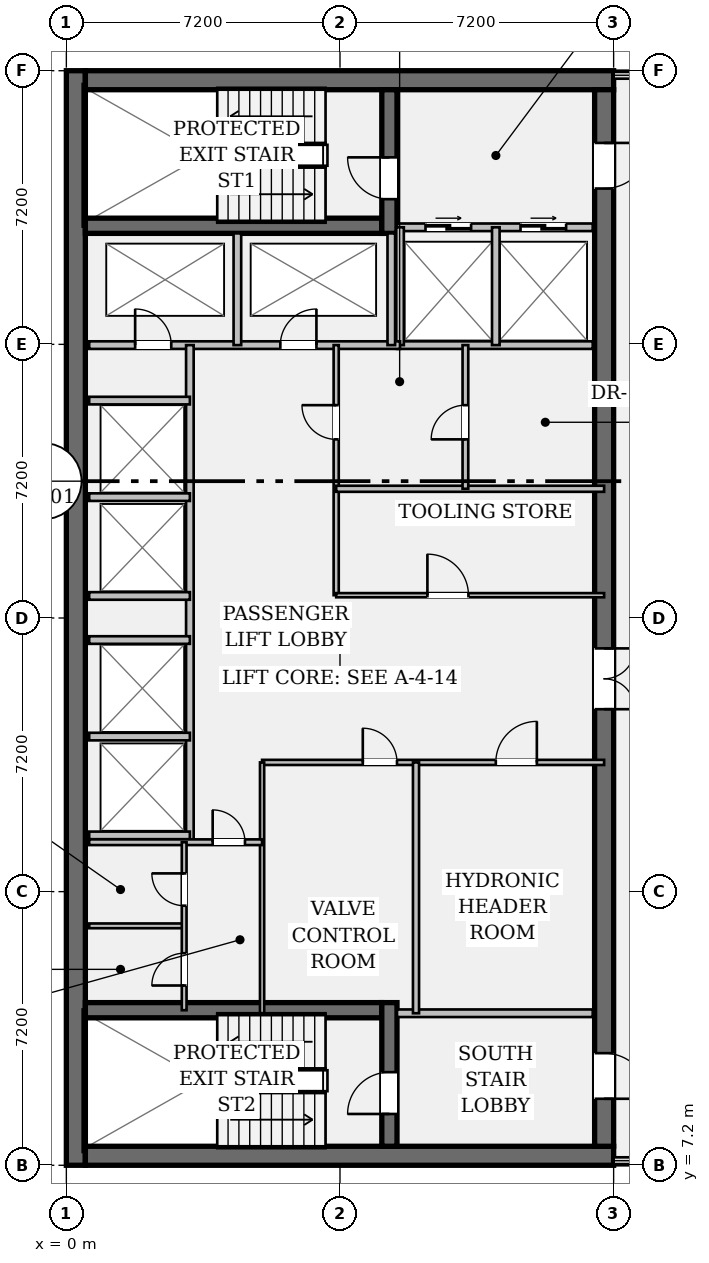
"""IFC4 building model, lengths in metres.
Left out: names, types, materials, properties, quantities, classifications, styles, units other than length and angle.
Written with IfcOpenShell. Run it as: python <this file> out.ifc"""

import sys

from ifc_helpers import new_model, si_unit, direction, frame, frame_2d, origin, place, context, subcontext, project, spatial, rectangle, extrude, element, fill, save


model = new_model("IFC4")
c1 = context("Model", 3, precision=1e-05, world=origin(), true_north=direction((0.0, 1.0)))
c2 = subcontext(c1, "Body", "Model", "MODEL_VIEW")
j1 = project(units=[si_unit("LENGTHUNIT", "METRE"), si_unit("PLANEANGLEUNIT", "RADIAN")], contexts=[c1])
p1 = place(None, origin())
s1 = spatial("IfcSite", under=j1, at=p1, CompositionType="ELEMENT")
p2 = place(p1, origin())
s2 = spatial("IfcBuilding", under=s1, at=p2, CompositionType="ELEMENT")
p3 = place(p2, frame((0.0, 0.0, 293.65)))
s3 = spatial("IfcBuildingStorey", under=s2, at=p3, CompositionType="ELEMENT", Elevation=293.65)
p4 = place(p3, frame((0.25, 7.2, 0.0), z_axis=(0.0, 0.0, 1.0), x_axis=(0.0, 1.0, 0.0)))
e1 = element("IfcWall", 1, at=p4, inside=s3, PredefinedType="SHEAR", context=c2, shape_type="SweptSolid", body=[
    extrude(rectangle(XDim=28.8, YDim=0.5, at=frame_2d((14.4, 0.0))), origin(), (0.0, 0.0, 1.0), 3.59),
])
for number, where, z_axis, x_axis in (
    (2, (0.5, 7.45, 0.0), (0.0, 0.0, 1.0), (1.0, 0.0, 0.0)),
    (3, (0.5, 35.75, 0.0), (0.0, 0.0, 1.0), (1.0, 0.0, 0.0)),
):
    element("IfcWall", number, at=place(p3, frame(where, z_axis=z_axis, x_axis=x_axis)), inside=s3, PredefinedType="SHEAR", context=c2, shape_type="SweptSolid", body=[
        extrude(rectangle(XDim=13.9, YDim=0.5, at=frame_2d((6.95, 0.0))), origin(), (0.0, 0.0, 1.0), 3.59),
    ])
p5 = place(p3, frame((14.15, 35.5, 0.0), z_axis=(0.0, 0.0, 1.0), x_axis=(0.0, -1.0, 0.0)))
e4 = element("IfcWall", 4, at=p5, inside=s3, PredefinedType="SHEAR", context=c2, shape_type="SweptSolid", body=[
    extrude(rectangle(XDim=27.8, YDim=0.5, at=frame_2d((13.9, 0.0))), origin(), (0.0, 0.0, 1.0), 3.59),
])
p6 = place(p5, frame((1.4, 0.0, 0.0)))
e5 = element("IfcOpeningElement", 5, at=p6, cuts=e4, PredefinedType="OPENING", context=c2, shape_type="SweptSolid", body=[
    extrude(rectangle(XDim=1.2, YDim=2.15, at=frame_2d((0.6, 1.075))), frame((0.0, 0.262, 0.0), z_axis=(0.0, -1.0, 0.0), x_axis=(1.0, 0.0, 0.0)), (0.0, 0.0, 1.0), 0.524),
])
p7 = place(p5, frame((25.35, 0.0, 0.0)))
e6 = element("IfcOpeningElement", 6, at=p7, cuts=e4, PredefinedType="OPENING", context=c2, shape_type="SweptSolid", body=[
    extrude(rectangle(XDim=1.2, YDim=2.15, at=frame_2d((0.6, 1.075))), frame((0.0, 0.262, 0.0), z_axis=(0.0, -1.0, 0.0), x_axis=(1.0, 0.0, 0.0)), (0.0, 0.0, 1.0), 0.524),
])
p8 = place(p5, frame((14.7, 0.0, 0.0)))
e7 = element("IfcOpeningElement", 7, at=p8, cuts=e4, PredefinedType="OPENING", context=c2, shape_type="SweptSolid", body=[
    extrude(rectangle(XDim=1.6, YDim=2.2, at=frame_2d((0.8, 1.1))), frame((0.0, 0.262, 0.0), z_axis=(0.0, -1.0, 0.0), x_axis=(1.0, 0.0, 0.0)), (0.0, 0.0, 1.0), 0.524),
])
for number, where, z_axis, x_axis in (
    (8, (0.5, 31.92, 0.0), (0.0, 0.0, 1.0), (1.0, 0.0, 0.0)),
    (9, (0.5, 11.28, 0.0), (0.0, 0.0, 1.0), (1.0, 0.0, 0.0)),
):
    element("IfcWall", number, at=place(p3, frame(where, z_axis=z_axis, x_axis=x_axis)), inside=s3, PredefinedType="SHEAR", context=c2, shape_type="SweptSolid", body=[
        extrude(rectangle(XDim=7.8, YDim=0.4, at=frame_2d((3.9, 0.0))), origin(), (0.0, 0.0, 1.0), 3.59),
    ])
p9 = place(p3, frame((8.5, 31.72, 0.0), z_axis=(0.0, 0.0, 1.0), x_axis=(0.0, 1.0, 0.0)))
e10 = element("IfcWall", 10, at=p9, inside=s3, PredefinedType="SHEAR", context=c2, shape_type="SweptSolid", body=[
    extrude(rectangle(XDim=3.78, YDim=0.4, at=frame_2d((1.89, 0.0))), origin(), (0.0, 0.0, 1.0), 3.59),
])
p10 = place(p9, frame((0.9, 0.0, 0.0)))
e11 = element("IfcOpeningElement", 11, at=p10, cuts=e10, PredefinedType="OPENING", context=c2, shape_type="SweptSolid", body=[
    extrude(rectangle(XDim=1.1, YDim=2.15, at=frame_2d((0.55, 1.075))), frame((0.0, 0.212, 0.0), z_axis=(0.0, -1.0, 0.0), x_axis=(1.0, 0.0, 0.0)), (0.0, 0.0, 1.0), 0.424),
])
p11 = place(p3, frame((8.5, 7.7, 0.0), z_axis=(0.0, 0.0, 1.0), x_axis=(0.0, 1.0, 0.0)))
e12 = element("IfcWall", 12, at=p11, inside=s3, PredefinedType="SHEAR", context=c2, shape_type="SweptSolid", body=[
    extrude(rectangle(XDim=3.78, YDim=0.4, at=frame_2d((1.89, 0.0))), origin(), (0.0, 0.0, 1.0), 3.59),
])
p12 = place(p11, frame((0.85, 0.0, 0.0)))
e13 = element("IfcOpeningElement", 13, at=p12, cuts=e12, PredefinedType="OPENING", context=c2, shape_type="SweptSolid", body=[
    extrude(rectangle(XDim=1.1, YDim=2.15, at=frame_2d((0.55, 1.075))), frame((0.0, 0.212, 0.0), z_axis=(0.0, -1.0, 0.0), x_axis=(1.0, 0.0, 0.0)), (0.0, 0.0, 1.0), 0.424),
])
p13 = place(p3, frame((8.7, 31.88, 0.0), z_axis=(0.0, 0.0, 1.0), x_axis=(1.0, 0.0, 0.0)))
e14 = element("IfcWall", 14, at=p13, inside=s3, PredefinedType="PARTITIONING", context=c2, shape_type="SweptSolid", body=[
    extrude(rectangle(XDim=5.15, YDim=0.2, at=frame_2d((2.575, 0.0))), origin(), (0.0, 0.0, 1.0), 3.59),
])
p14 = place(p13, frame((0.75, 0.0, 0.0)))
e15 = element("IfcOpeningElement", 15, at=p14, cuts=e14, PredefinedType="OPENING", context=c2, shape_type="SweptSolid", body=[
    extrude(rectangle(XDim=1.2, YDim=2.2, at=frame_2d((0.6, 1.1))), frame((0.0, 0.112, 0.0), z_axis=(0.0, -1.0, 0.0), x_axis=(1.0, 0.0, 0.0)), (0.0, 0.0, 1.0), 0.224),
])
p15 = place(p13, frame((3.25, 0.0, 0.0)))
e16 = element("IfcOpeningElement", 16, at=p15, cuts=e14, PredefinedType="OPENING", context=c2, shape_type="SweptSolid", body=[
    extrude(rectangle(XDim=1.2, YDim=2.2, at=frame_2d((0.6, 1.1))), frame((0.0, 0.112, 0.0), z_axis=(0.0, -1.0, 0.0), x_axis=(1.0, 0.0, 0.0)), (0.0, 0.0, 1.0), 0.224),
])
for number, where, z_axis, x_axis in (
    (17, (8.7, 11.2, 0.0), (0.0, 0.0, 1.0), (1.0, 0.0, 0.0)),
    (18, (8.7, 28.78, 0.0), (0.0, 0.0, 1.0), (1.0, 0.0, 0.0)),
):
    element("IfcWall", number, at=place(p3, frame(where, z_axis=z_axis, x_axis=x_axis)), inside=s3, PredefinedType="PARTITIONING", context=c2, shape_type="SweptSolid", body=[
        extrude(rectangle(XDim=5.15, YDim=0.2, at=frame_2d((2.575, 0.0))), origin(), (0.0, 0.0, 1.0), 3.59),
    ])
for number, where, z_axis, x_axis in (
    (19, (8.78, 28.78, 0.0), (0.0, 0.0, 1.0), (0.0, 1.0, 0.0)),
    (20, (11.3, 28.78, 0.0), (0.0, 0.0, 1.0), (0.0, 1.0, 0.0)),
):
    element("IfcWall", number, at=place(p3, frame(where, z_axis=z_axis, x_axis=x_axis)), inside=s3, PredefinedType="PARTITIONING", context=c2, shape_type="SweptSolid", body=[
        extrude(rectangle(XDim=3.1, YDim=0.2, at=frame_2d((1.55, 0.0))), origin(), (0.0, 0.0, 1.0), 3.59),
    ])
p16 = place(p3, frame((0.6, 28.78, 0.0), z_axis=(0.0, 0.0, 1.0), x_axis=(1.0, 0.0, 0.0)))
e21 = element("IfcWall", 21, at=p16, inside=s3, PredefinedType="PARTITIONING", context=c2, shape_type="SweptSolid", body=[
    extrude(rectangle(XDim=8.18, YDim=0.2, at=frame_2d((4.09, 0.0))), origin(), (0.0, 0.0, 1.0), 3.59),
])
p17 = place(p16, frame((1.21, 0.0, 0.0)))
e22 = element("IfcOpeningElement", 22, at=p17, cuts=e21, PredefinedType="OPENING", context=c2, shape_type="SweptSolid", body=[
    extrude(rectangle(XDim=0.95, YDim=2.15, at=frame_2d((0.475, 1.075))), frame((0.0, 0.112, 0.0), z_axis=(0.0, -1.0, 0.0), x_axis=(1.0, 0.0, 0.0)), (0.0, 0.0, 1.0), 0.224),
])
p18 = place(p16, frame((5.03, 0.0, 0.0)))
e23 = element("IfcOpeningElement", 23, at=p18, cuts=e21, PredefinedType="OPENING", context=c2, shape_type="SweptSolid", body=[
    extrude(rectangle(XDim=0.95, YDim=2.15, at=frame_2d((0.475, 1.075))), frame((0.0, 0.112, 0.0), z_axis=(0.0, -1.0, 0.0), x_axis=(1.0, 0.0, 0.0)), (0.0, 0.0, 1.0), 0.224),
])
for number, where, z_axis, x_axis in (
    (24, (4.5, 28.78, 0.0), (0.0, 0.0, 1.0), (0.0, 1.0, 0.0)),
    (25, (8.55, 28.78, 0.0), (0.0, 0.0, 1.0), (0.0, 1.0, 0.0)),
):
    element("IfcWall", number, at=place(p3, frame(where, z_axis=z_axis, x_axis=x_axis)), inside=s3, PredefinedType="PARTITIONING", context=c2, shape_type="SweptSolid", body=[
        extrude(rectangle(XDim=2.94, YDim=0.2, at=frame_2d((1.47, 0.0))), origin(), (0.0, 0.0, 1.0), 3.59),
    ])
p19 = place(p3, frame((3.25, 15.7, 0.0), z_axis=(0.0, 0.0, 1.0), x_axis=(0.0, 1.0, 0.0)))
e26 = element("IfcWall", 26, at=p19, inside=s3, PredefinedType="PARTITIONING", context=c2, shape_type="SweptSolid", body=[
    extrude(rectangle(XDim=13.08, YDim=0.2, at=frame_2d((6.54, 0.0))), origin(), (0.0, 0.0, 1.0), 3.59),
])
for number, where, z_axis, x_axis in (
    (27, (0.6, 15.88, 0.0), (0.0, 0.0, 1.0), (1.0, 0.0, 0.0)),
    (28, (0.6, 18.48, 0.0), (0.0, 0.0, 1.0), (1.0, 0.0, 0.0)),
    (29, (0.6, 22.18, 0.0), (0.0, 0.0, 1.0), (1.0, 0.0, 0.0)),
    (30, (0.6, 24.78, 0.0), (0.0, 0.0, 1.0), (1.0, 0.0, 0.0)),
    (31, (0.6, 21.02, 0.0), (0.0, 0.0, 1.0), (1.0, 0.0, 0.0)),
    (32, (0.6, 27.32, 0.0), (0.0, 0.0, 1.0), (1.0, 0.0, 0.0)),
):
    element("IfcWall", number, at=place(p3, frame(where, z_axis=z_axis, x_axis=x_axis)), inside=s3, PredefinedType="PARTITIONING", context=c2, shape_type="SweptSolid", body=[
        extrude(rectangle(XDim=2.65, YDim=0.2, at=frame_2d((1.325, 0.0))), origin(), (0.0, 0.0, 1.0), 3.59),
    ])
p20 = place(p3, frame((7.1, 22.2, 0.0), z_axis=(0.0, 0.0, 1.0), x_axis=(0.0, 1.0, 0.0)))
e33 = element("IfcWall", 33, at=p20, inside=s3, PredefinedType="PARTITIONING", context=c2, shape_type="SweptSolid", body=[
    extrude(rectangle(XDim=6.58, YDim=0.135, at=frame_2d((3.29, 0.0))), origin(), (0.0, 0.0, 1.0), 3.59),
])
p21 = place(p20, frame((4.1, 0.0, 0.0)))
e34 = element("IfcOpeningElement", 34, at=p21, cuts=e33, PredefinedType="OPENING", context=c2, shape_type="SweptSolid", body=[
    extrude(rectangle(XDim=0.9, YDim=2.15, at=frame_2d((0.45, 1.075))), frame((0.0, 0.08, 0.0), z_axis=(0.0, -1.0, 0.0), x_axis=(1.0, 0.0, 0.0)), (0.0, 0.0, 1.0), 0.159),
])
p22 = place(p3, frame((7.1, 22.2, 0.0), z_axis=(0.0, 0.0, 1.0), x_axis=(1.0, 0.0, 0.0)))
e35 = element("IfcWall", 35, at=p22, inside=s3, PredefinedType="PARTITIONING", context=c2, shape_type="SweptSolid", body=[
    extrude(rectangle(XDim=7.05, YDim=0.11, at=frame_2d((3.525, 0.0))), origin(), (0.0, 0.0, 1.0), 3.59),
])
p23 = place(p22, frame((2.4, 0.0, 0.0)))
e36 = element("IfcOpeningElement", 36, at=p23, cuts=e35, PredefinedType="OPENING", context=c2, shape_type="SweptSolid", body=[
    extrude(rectangle(XDim=1.08, YDim=2.15, at=frame_2d((0.54, 1.075))), frame((0.0, 0.067, 0.0), z_axis=(0.0, -1.0, 0.0), x_axis=(1.0, 0.0, 0.0)), (0.0, 0.0, 1.0), 0.134),
])
p24 = place(p3, frame((7.1, 25.0, 0.0), z_axis=(0.0, 0.0, 1.0), x_axis=(1.0, 0.0, 0.0)))
e37 = element("IfcWall", 37, at=p24, inside=s3, PredefinedType="PARTITIONING", context=c2, shape_type="SweptSolid", body=[
    extrude(rectangle(XDim=7.05, YDim=0.16, at=frame_2d((3.525, 0.0))), origin(), (0.0, 0.0, 1.0), 3.59),
])
p25 = place(p3, frame((10.5, 25.0, 0.0), z_axis=(0.0, 0.0, 1.0), x_axis=(0.0, 1.0, 0.0)))
e38 = element("IfcWall", 38, at=p25, inside=s3, PredefinedType="PARTITIONING", context=c2, shape_type="SweptSolid", body=[
    extrude(rectangle(XDim=3.78, YDim=0.15, at=frame_2d((1.89, 0.0))), origin(), (0.0, 0.0, 1.0), 3.59),
])
p26 = place(p25, frame((1.3, 0.0, 0.0)))
e39 = element("IfcOpeningElement", 39, at=p26, cuts=e38, PredefinedType="OPENING", context=c2, shape_type="SweptSolid", body=[
    extrude(rectangle(XDim=0.9, YDim=2.15, at=frame_2d((0.45, 1.075))), frame((0.0, 0.087, 0.0), z_axis=(0.0, -1.0, 0.0), x_axis=(1.0, 0.0, 0.0)), (0.0, 0.0, 1.0), 0.174),
])
p27 = place(p3, frame((5.15, 17.8, 0.0), z_axis=(0.0, 0.0, 1.0), x_axis=(1.0, 0.0, 0.0)))
e40 = element("IfcWall", 40, at=p27, inside=s3, PredefinedType="PARTITIONING", context=c2, shape_type="SweptSolid", body=[
    extrude(rectangle(XDim=9.0, YDim=0.135, at=frame_2d((4.5, 0.0))), origin(), (0.0, 0.0, 1.0), 3.59),
])
p28 = place(p27, frame((2.65, 0.0, 0.0)))
e41 = element("IfcOpeningElement", 41, at=p28, cuts=e40, PredefinedType="OPENING", context=c2, shape_type="SweptSolid", body=[
    extrude(rectangle(XDim=0.9, YDim=2.15, at=frame_2d((0.45, 1.075))), frame((0.0, 0.08, 0.0), z_axis=(0.0, -1.0, 0.0), x_axis=(1.0, 0.0, 0.0)), (0.0, 0.0, 1.0), 0.159),
])
p29 = place(p27, frame((6.15, 0.0, 0.0)))
e42 = element("IfcOpeningElement", 42, at=p29, cuts=e40, PredefinedType="OPENING", context=c2, shape_type="SweptSolid", body=[
    extrude(rectangle(XDim=1.08, YDim=2.15, at=frame_2d((0.54, 1.075))), frame((0.0, 0.08, 0.0), z_axis=(0.0, -1.0, 0.0), x_axis=(1.0, 0.0, 0.0)), (0.0, 0.0, 1.0), 0.159),
])
p30 = place(p3, frame((5.15, 11.2, 0.0), z_axis=(0.0, 0.0, 1.0), x_axis=(0.0, 1.0, 0.0)))
e43 = element("IfcWall", 43, at=p30, inside=s3, PredefinedType="PARTITIONING", context=c2, shape_type="SweptSolid", body=[
    extrude(rectangle(XDim=6.6, YDim=0.11, at=frame_2d((3.3, 0.0))), origin(), (0.0, 0.0, 1.0), 3.59),
])
p31 = place(p3, frame((9.2, 11.2, 0.0), z_axis=(0.0, 0.0, 1.0), x_axis=(0.0, 1.0, 0.0)))
e44 = element("IfcWall", 44, at=p31, inside=s3, PredefinedType="PARTITIONING", context=c2, shape_type="SweptSolid", body=[
    extrude(rectangle(XDim=6.6, YDim=0.16, at=frame_2d((3.3, 0.0))), origin(), (0.0, 0.0, 1.0), 3.59),
])
p32 = place(p3, frame((0.6, 15.7, 0.0), z_axis=(0.0, 0.0, 1.0), x_axis=(1.0, 0.0, 0.0)))
e45 = element("IfcWall", 45, at=p32, inside=s3, PredefinedType="PARTITIONING", context=c2, shape_type="SweptSolid", body=[
    extrude(rectangle(XDim=4.55, YDim=0.15, at=frame_2d((2.275, 0.0))), origin(), (0.0, 0.0, 1.0), 3.59),
])
p33 = place(p32, frame((3.25, 0.0, 0.0)))
e46 = element("IfcOpeningElement", 46, at=p33, cuts=e45, PredefinedType="OPENING", context=c2, shape_type="SweptSolid", body=[
    extrude(rectangle(XDim=0.85, YDim=2.15, at=frame_2d((0.425, 1.075))), frame((0.0, 0.087, 0.0), z_axis=(0.0, -1.0, 0.0), x_axis=(1.0, 0.0, 0.0)), (0.0, 0.0, 1.0), 0.174),
])
p34 = place(p3, frame((0.6, 13.5, 0.0), z_axis=(0.0, 0.0, 1.0), x_axis=(1.0, 0.0, 0.0)))
e47 = element("IfcWall", 47, at=p34, inside=s3, PredefinedType="PARTITIONING", context=c2, shape_type="SweptSolid", body=[
    extrude(rectangle(XDim=2.5, YDim=0.125, at=frame_2d((1.25, 0.0))), origin(), (0.0, 0.0, 1.0), 3.59),
])
p35 = place(p3, frame((3.1, 11.28, 0.0), z_axis=(0.0, 0.0, 1.0), x_axis=(0.0, 1.0, 0.0)))
e48 = element("IfcWall", 48, at=p35, inside=s3, PredefinedType="PARTITIONING", context=c2, shape_type="SweptSolid", body=[
    extrude(rectangle(XDim=4.42, YDim=0.125, at=frame_2d((2.21, 0.0))), origin(), (0.0, 0.0, 1.0), 3.59),
])
p36 = place(p35, frame((0.65, 0.0, 0.0)))
e49 = element("IfcOpeningElement", 49, at=p36, cuts=e48, PredefinedType="OPENING", context=c2, shape_type="SweptSolid", body=[
    extrude(rectangle(XDim=0.85, YDim=2.15, at=frame_2d((0.425, 1.075))), frame((0.0, 0.074, 0.0), z_axis=(0.0, -1.0, 0.0), x_axis=(1.0, 0.0, 0.0)), (0.0, 0.0, 1.0), 0.149),
])
p37 = place(p35, frame((2.75, 0.0, 0.0)))
e50 = element("IfcOpeningElement", 50, at=p37, cuts=e48, PredefinedType="OPENING", context=c2, shape_type="SweptSolid", body=[
    extrude(rectangle(XDim=0.85, YDim=2.15, at=frame_2d((0.425, 1.075))), frame((0.0, 0.074, 0.0), z_axis=(0.0, -1.0, 0.0), x_axis=(1.0, 0.0, 0.0)), (0.0, 0.0, 1.0), 0.149),
])
p38 = place(p10, origin())
e51 = element("IfcDoor", 51, at=p38, inside=s3, OperationType="SINGLE_SWING_RIGHT", PredefinedType="DOOR", context=c2, shape_type="SweptSolid", body=[
    extrude(rectangle(XDim=1.1, YDim=2.15, at=frame_2d((0.55, 1.075))), frame((0.0, 0.025, 0.0), z_axis=(0.0, -1.0, 0.0), x_axis=(1.0, 0.0, 0.0)), (0.0, 0.0, 1.0), 0.05),
])
fill(e11, e51)
p39 = place(p6, origin())
e52 = element("IfcDoor", 52, at=p39, inside=s3, OperationType="SINGLE_SWING_LEFT", PredefinedType="DOOR", context=c2, shape_type="SweptSolid", body=[
    extrude(rectangle(XDim=1.2, YDim=2.15, at=frame_2d((0.6, 1.075))), frame((0.0, 0.025, 0.0), z_axis=(0.0, -1.0, 0.0), x_axis=(1.0, 0.0, 0.0)), (0.0, 0.0, 1.0), 0.05),
])
fill(e5, e52)
p40 = place(p12, origin())
e53 = element("IfcDoor", 53, at=p40, inside=s3, OperationType="SINGLE_SWING_LEFT", PredefinedType="DOOR", context=c2, shape_type="SweptSolid", body=[
    extrude(rectangle(XDim=1.1, YDim=2.15, at=frame_2d((0.55, 1.075))), frame((0.0, 0.025, 0.0), z_axis=(0.0, -1.0, 0.0), x_axis=(1.0, 0.0, 0.0)), (0.0, 0.0, 1.0), 0.05),
])
fill(e13, e53)
p41 = place(p7, origin())
e54 = element("IfcDoor", 54, at=p41, inside=s3, OperationType="SINGLE_SWING_RIGHT", PredefinedType="DOOR", context=c2, shape_type="SweptSolid", body=[
    extrude(rectangle(XDim=1.2, YDim=2.15, at=frame_2d((0.6, 1.075))), frame((0.0, 0.025, 0.0), z_axis=(0.0, -1.0, 0.0), x_axis=(1.0, 0.0, 0.0)), (0.0, 0.0, 1.0), 0.05),
])
fill(e6, e54)
p42 = place(p14, origin())
e55 = element("IfcDoor", 55, at=p42, inside=s3, OperationType="DOUBLE_DOOR_SLIDING", PredefinedType="DOOR", context=c2, shape_type="SweptSolid", body=[
    extrude(rectangle(XDim=1.2, YDim=2.2, at=frame_2d((0.6, 1.1))), frame((0.0, 0.025, 0.0), z_axis=(0.0, -1.0, 0.0), x_axis=(1.0, 0.0, 0.0)), (0.0, 0.0, 1.0), 0.05),
])
fill(e15, e55)
p43 = place(p15, origin())
e56 = element("IfcDoor", 56, at=p43, inside=s3, OperationType="DOUBLE_DOOR_SLIDING", PredefinedType="DOOR", context=c2, shape_type="SweptSolid", body=[
    extrude(rectangle(XDim=1.2, YDim=2.2, at=frame_2d((0.6, 1.1))), frame((0.0, 0.025, 0.0), z_axis=(0.0, -1.0, 0.0), x_axis=(1.0, 0.0, 0.0)), (0.0, 0.0, 1.0), 0.05),
])
fill(e16, e56)
p44 = place(p17, origin())
e57 = element("IfcDoor", 57, at=p44, inside=s3, OperationType="SINGLE_SWING_LEFT", PredefinedType="DOOR", context=c2, shape_type="SweptSolid", body=[
    extrude(rectangle(XDim=0.95, YDim=2.15, at=frame_2d((0.475, 1.075))), frame((0.0, 0.025, 0.0), z_axis=(0.0, -1.0, 0.0), x_axis=(1.0, 0.0, 0.0)), (0.0, 0.0, 1.0), 0.05),
])
fill(e22, e57)
p45 = place(p18, origin())
e58 = element("IfcDoor", 58, at=p45, inside=s3, OperationType="SINGLE_SWING_RIGHT", PredefinedType="DOOR", context=c2, shape_type="SweptSolid", body=[
    extrude(rectangle(XDim=0.95, YDim=2.15, at=frame_2d((0.475, 1.075))), frame((0.0, 0.025, 0.0), z_axis=(0.0, -1.0, 0.0), x_axis=(1.0, 0.0, 0.0)), (0.0, 0.0, 1.0), 0.05),
])
fill(e23, e58)
p46 = place(p8, origin())
e59 = element("IfcDoor", 59, at=p46, inside=s3, OperationType="DOUBLE_DOOR_SINGLE_SWING", PredefinedType="DOOR", context=c2, shape_type="SweptSolid", body=[
    extrude(rectangle(XDim=1.6, YDim=2.2, at=frame_2d((0.8, 1.1))), frame((0.0, 0.025, 0.0), z_axis=(0.0, -1.0, 0.0), x_axis=(1.0, 0.0, 0.0)), (0.0, 0.0, 1.0), 0.05),
])
fill(e7, e59)
p47 = place(p23, origin())
e60 = element("IfcDoor", 60, at=p47, inside=s3, OperationType="SINGLE_SWING_LEFT", PredefinedType="DOOR", context=c2, shape_type="SweptSolid", body=[
    extrude(rectangle(XDim=1.08, YDim=2.15, at=frame_2d((0.54, 1.075))), frame((0.0, 0.025, 0.0), z_axis=(0.0, -1.0, 0.0), x_axis=(1.0, 0.0, 0.0)), (0.0, 0.0, 1.0), 0.05),
])
fill(e36, e60)
p48 = place(p21, origin())
e61 = element("IfcDoor", 61, at=p48, inside=s3, OperationType="SINGLE_SWING_RIGHT", PredefinedType="DOOR", context=c2, shape_type="SweptSolid", body=[
    extrude(rectangle(XDim=0.9, YDim=2.15, at=frame_2d((0.45, 1.075))), frame((0.0, 0.025, 0.0), z_axis=(0.0, -1.0, 0.0), x_axis=(1.0, 0.0, 0.0)), (0.0, 0.0, 1.0), 0.05),
])
fill(e34, e61)
p49 = place(p26, origin())
e62 = element("IfcDoor", 62, at=p49, inside=s3, OperationType="SINGLE_SWING_LEFT", PredefinedType="DOOR", context=c2, shape_type="SweptSolid", body=[
    extrude(rectangle(XDim=0.9, YDim=2.15, at=frame_2d((0.45, 1.075))), frame((0.0, 0.025, 0.0), z_axis=(0.0, -1.0, 0.0), x_axis=(1.0, 0.0, 0.0)), (0.0, 0.0, 1.0), 0.05),
])
fill(e39, e62)
p50 = place(p28, origin())
e63 = element("IfcDoor", 63, at=p50, inside=s3, OperationType="SINGLE_SWING_LEFT", PredefinedType="DOOR", context=c2, shape_type="SweptSolid", body=[
    extrude(rectangle(XDim=0.9, YDim=2.15, at=frame_2d((0.45, 1.075))), frame((0.0, 0.025, 0.0), z_axis=(0.0, -1.0, 0.0), x_axis=(1.0, 0.0, 0.0)), (0.0, 0.0, 1.0), 0.05),
])
fill(e41, e63)
p51 = place(p29, origin())
e64 = element("IfcDoor", 64, at=p51, inside=s3, OperationType="SINGLE_SWING_RIGHT", PredefinedType="DOOR", context=c2, shape_type="SweptSolid", body=[
    extrude(rectangle(XDim=1.08, YDim=2.15, at=frame_2d((0.54, 1.075))), frame((0.0, 0.025, 0.0), z_axis=(0.0, -1.0, 0.0), x_axis=(1.0, 0.0, 0.0)), (0.0, 0.0, 1.0), 0.05),
])
fill(e42, e64)
p52 = place(p33, origin())
e65 = element("IfcDoor", 65, at=p52, inside=s3, OperationType="SINGLE_SWING_LEFT", PredefinedType="DOOR", context=c2, shape_type="SweptSolid", body=[
    extrude(rectangle(XDim=0.85, YDim=2.15, at=frame_2d((0.425, 1.075))), frame((0.0, 0.025, 0.0), z_axis=(0.0, -1.0, 0.0), x_axis=(1.0, 0.0, 0.0)), (0.0, 0.0, 1.0), 0.05),
])
fill(e46, e65)
p53 = place(p36, origin())
e66 = element("IfcDoor", 66, at=p53, inside=s3, OperationType="SINGLE_SWING_LEFT", PredefinedType="DOOR", context=c2, shape_type="SweptSolid", body=[
    extrude(rectangle(XDim=0.85, YDim=2.15, at=frame_2d((0.425, 1.075))), frame((0.0, 0.025, 0.0), z_axis=(0.0, -1.0, 0.0), x_axis=(1.0, 0.0, 0.0)), (0.0, 0.0, 1.0), 0.05),
])
fill(e49, e66)
p54 = place(p37, origin())
e67 = element("IfcDoor", 67, at=p54, inside=s3, OperationType="SINGLE_SWING_RIGHT", PredefinedType="DOOR", context=c2, shape_type="SweptSolid", body=[
    extrude(rectangle(XDim=0.85, YDim=2.15, at=frame_2d((0.425, 1.075))), frame((0.0, 0.025, 0.0), z_axis=(0.0, -1.0, 0.0), x_axis=(1.0, 0.0, 0.0)), (0.0, 0.0, 1.0), 0.05),
])
fill(e50, e67)
save(model, sys.argv[1])
